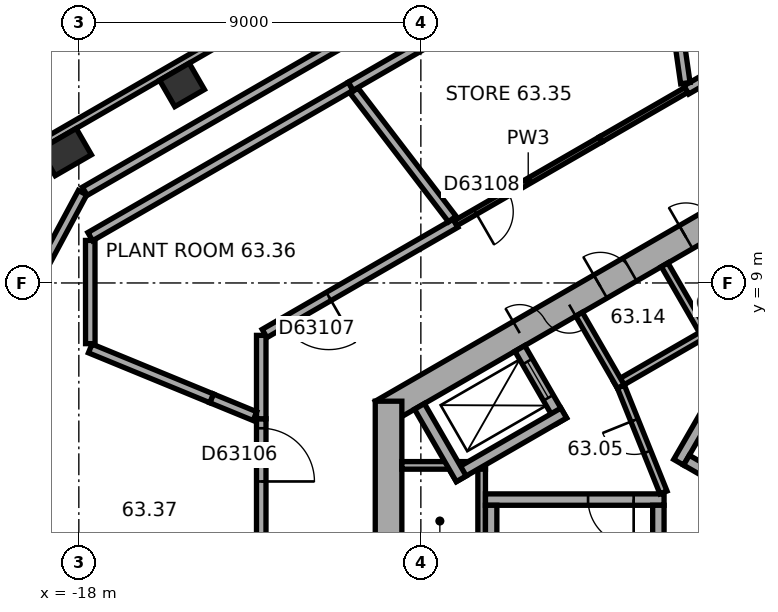
"""IFC4 building model, lengths in metres.
Left out: names, types, materials, properties, quantities, classifications, styles, units other than length and angle.
Written with IfcOpenShell. Run it as: python <this file> out.ifc"""

import sys

from ifc_helpers import new_model, si_unit, direction, frame, frame_2d, origin, origin_2d, place, context, subcontext, project, spatial, rectangle, extrude, element, fill, save


model = new_model("IFC4")
c1 = context("Model", 3, precision=1e-05, world=origin(), true_north=direction((0.0, 1.0)))
c2 = subcontext(c1, "Body", "Model", "MODEL_VIEW")
j1 = project(units=[si_unit("LENGTHUNIT", "METRE"), si_unit("PLANEANGLEUNIT", "RADIAN")], contexts=[c1])
p1 = place(None, origin())
s1 = spatial("IfcSite", under=j1, at=p1, CompositionType="ELEMENT")
p2 = place(p1, origin())
s2 = spatial("IfcBuilding", under=s1, at=p2, CompositionType="ELEMENT")
p3 = place(p2, frame((0.0, 0.0, 255.0)))
s3 = spatial("IfcBuildingStorey", under=s2, at=p3, CompositionType="ELEMENT", Elevation=255.0)
p4 = place(p3, frame((-15.285, 14.211, 0.0), z_axis=(0.0, 0.0, 1.0), x_axis=(-0.866025403784, -0.5, 0.0)))
e1 = element("IfcColumn", 1, at=p4, inside=s3, PredefinedType="COLUMN", context=c2, shape_type="SweptSolid", body=[
    extrude(rectangle(XDim=0.9, YDim=0.8, at=origin_2d()), origin(), (0.0, 0.0, 1.0), 4.8),
])
p5 = place(p3, frame((-18.345, 12.445, 0.0), z_axis=(0.0, 0.0, 1.0), x_axis=(-0.866025403784, -0.5, 0.0)))
e2 = element("IfcColumn", 2, at=p5, inside=s3, PredefinedType="COLUMN", context=c2, shape_type="SweptSolid", body=[
    extrude(rectangle(XDim=1.1, YDim=0.8, at=origin_2d()), origin(), (0.0, 0.0, 1.0), 4.8),
])
p6 = place(p3, frame((0.175, 11.475, 0.0), z_axis=(0.0, 0.0, 1.0), x_axis=(-0.866026453023, -0.499998182661, 0.0)))
e3 = element("IfcWall", 3, at=p6, inside=s3, PredefinedType="SHEAR", context=c2, shape_type="SweptSolid", body=[
    extrude(rectangle(XDim=11.778, YDim=0.7, at=frame_2d((5.889, 0.0))), origin(), (0.0, 0.0, 1.0), 4.8),
])
p7 = place(p6, frame((6.089, 0.0, 0.0)))
e4 = element("IfcOpeningElement", 4, at=p7, cuts=e3, PredefinedType="OPENING", context=c2, shape_type="SweptSolid", body=[
    extrude(rectangle(XDim=1.5, YDim=2.1, at=frame_2d((0.75, 1.05))), frame((0.0, 0.36, 0.0), z_axis=(0.0, -1.0, 0.0), x_axis=(1.0, 0.0, 0.0)), (0.0, 0.0, 1.0), 0.72),
])
p8 = place(p6, frame((1.639, 0.0, 0.0)))
e5 = element("IfcOpeningElement", 5, at=p8, cuts=e3, PredefinedType="OPENING", context=c2, shape_type="SweptSolid", body=[
    extrude(rectangle(XDim=0.9, YDim=2.1, at=frame_2d((0.45, 1.05))), frame((0.0, 0.36, 0.0), z_axis=(0.0, -1.0, 0.0), x_axis=(1.0, 0.0, 0.0)), (0.0, 0.0, 1.0), 0.72),
])
p9 = place(p6, frame((4.239, 0.0, 0.0)))
e6 = element("IfcOpeningElement", 6, at=p9, cuts=e3, PredefinedType="OPENING", context=c2, shape_type="SweptSolid", body=[
    extrude(rectangle(XDim=0.9, YDim=2.1, at=frame_2d((0.45, 1.05))), frame((0.0, 0.36, 0.0), z_axis=(0.0, -1.0, 0.0), x_axis=(1.0, 0.0, 0.0)), (0.0, 0.0, 1.0), 0.72),
])
p10 = place(p3, frame((-9.85, 5.889, 0.0), z_axis=(0.0, 0.0, 1.0), x_axis=(0.0, -1.0, 0.0)))
e7 = element("IfcWall", 7, at=p10, inside=s3, PredefinedType="SHEAR", context=c2, shape_type="SweptSolid", body=[
    extrude(rectangle(XDim=11.778, YDim=0.7, at=frame_2d((5.889, 0.0))), origin(), (0.0, 0.0, 1.0), 4.8),
])
p11 = place(p10, frame((5.039, 0.0, 0.0)))
e8 = element("IfcOpeningElement", 8, at=p11, cuts=e7, PredefinedType="OPENING", context=c2, shape_type="SweptSolid", body=[
    extrude(rectangle(XDim=1.1, YDim=2.1, at=frame_2d((0.55, 1.05))), frame((0.0, 0.36, 0.0), z_axis=(0.0, -1.0, 0.0), x_axis=(1.0, 0.0, 0.0)), (0.0, 0.0, 1.0), 0.72),
])
p12 = place(p10, frame((7.639, 0.0, 0.0)))
e9 = element("IfcOpeningElement", 9, at=p12, cuts=e7, PredefinedType="OPENING", context=c2, shape_type="SweptSolid", body=[
    extrude(rectangle(XDim=1.1, YDim=2.1, at=frame_2d((0.55, 1.05))), frame((0.0, 0.36, 0.0), z_axis=(0.0, -1.0, 0.0), x_axis=(1.0, 0.0, 0.0)), (0.0, 0.0, 1.0), 0.72),
])
p13 = place(p3, frame((-2.786, 22.005, 0.0), z_axis=(0.0, 0.0, 1.0), x_axis=(-0.866026555358, -0.49999800541, 0.0)))
e10 = element("IfcWall", 10, at=p13, inside=s3, PredefinedType="STANDARD", context=c2, shape_type="SweptSolid", body=[
    extrude(rectangle(XDim=18.841, YDim=0.2, at=frame_2d((9.421, 0.0))), origin(), (0.0, 0.0, 1.0), 4.8),
])
p14 = place(p3, frame((0.803, 9.009, 0.0), z_axis=(0.0, 0.0, 1.0), x_axis=(-0.866028230842, -0.499995103361, 0.0)))
e11 = element("IfcWall", 11, at=p14, inside=s3, PredefinedType="PARTITIONING", context=c2, shape_type="SweptSolid", body=[
    extrude(rectangle(XDim=5.4, YDim=0.2, at=frame_2d((2.7, 0.0))), origin(), (0.0, 0.0, 1.0), 4.52),
])
for number, where, z_axis, x_axis in (
    (12, (-1.485, 7.572, 0.0), (0.0, 0.0, 1.0), (-0.5, 0.866, 0.0)),
    (13, (-3.737, 6.272, 0.0), (0.0, 0.0, 1.0), (-0.5, 0.866, 0.0)),
):
    element("IfcWall", number, at=place(p3, frame(where, z_axis=z_axis, x_axis=x_axis)), inside=s3, PredefinedType="PARTITIONING", context=c2, shape_type="SweptSolid", body=[
        extrude(rectangle(XDim=2.2, YDim=0.2, at=frame_2d((1.1, 0.0))), origin(), (0.0, 0.0, 1.0), 4.52),
    ])
p15 = place(p3, frame((-7.4, 4.3, 0.0), z_axis=(0.0, 0.0, 1.0), x_axis=(0.0, -1.0, 0.0)))
e14 = element("IfcWall", 14, at=p15, inside=s3, PredefinedType="PARTITIONING", context=c2, shape_type="SweptSolid", body=[
    extrude(rectangle(XDim=8.0, YDim=0.2, at=frame_2d((4.0, 0.0))), origin(), (0.0, 0.0, 1.0), 4.52),
])
p16 = place(p3, frame((-7.3, 4.2, 0.0), z_axis=(0.0, 0.0, 1.0), x_axis=(-1.0, 0.0, 0.0)))
e15 = element("IfcWall", 15, at=p16, inside=s3, PredefinedType="PARTITIONING", context=c2, shape_type="SweptSolid", body=[
    extrude(rectangle(XDim=2.2, YDim=0.2, at=frame_2d((1.1, 0.0))), origin(), (0.0, 0.0, 1.0), 4.52),
])
p17 = place(p3, frame((-2.216, 4.282, 0.0), z_axis=(0.0, 0.0, 1.0), x_axis=(0.499977259774, 0.866038532462, 0.0)))
e16 = element("IfcWall", 16, at=p17, inside=s3, PredefinedType="SHEAR", context=c2, shape_type="SweptSolid", body=[
    extrude(rectangle(XDim=4.7, YDim=0.3, at=frame_2d((2.35, 0.0))), origin(), (0.0, 0.0, 1.0), 4.52),
])
p18 = place(p3, frame((4.103, 0.807, 0.0), z_axis=(0.0, 0.0, 1.0), x_axis=(-0.866027801685, 0.499995846692, 0.0)))
e17 = element("IfcWall", 17, at=p18, inside=s3, PredefinedType="SHEAR", context=c2, shape_type="SweptSolid", body=[
    extrude(rectangle(XDim=7.06, YDim=0.3, at=frame_2d((3.53, 0.0))), origin(), (0.0, 0.0, 1.0), 4.52),
])
p19 = place(p3, frame((-2.6, 3.3, 0.0), z_axis=(0.0, 0.0, 1.0), x_axis=(-1.0, 0.0, 0.0)))
e18 = element("IfcWall", 18, at=p19, inside=s3, PredefinedType="SHEAR", context=c2, shape_type="SweptSolid", body=[
    extrude(rectangle(XDim=4.7, YDim=0.3, at=frame_2d((2.35, 0.0))), origin(), (0.0, 0.0, 1.0), 4.52),
])
p20 = place(p19, frame((0.8, 0.0, 0.0)))
e19 = element("IfcOpeningElement", 19, at=p20, cuts=e18, PredefinedType="OPENING", context=c2, shape_type="SweptSolid", body=[
    extrude(rectangle(XDim=1.2, YDim=2.1, at=frame_2d((0.6, 1.05))), frame((0.0, 0.16, 0.0), z_axis=(0.0, -1.0, 0.0), x_axis=(1.0, 0.0, 0.0)), (0.0, 0.0, 1.0), 0.32),
])
for number, where, z_axis, x_axis in (
    (20, (-2.75, 3.15, 0.0), (0.0, 0.0, 1.0), (0.0, -1.0, 0.0)),
    (21, (-7.15, 3.15, 0.0), (0.0, 0.0, 1.0), (0.0, -1.0, 0.0)),
):
    element("IfcWall", number, at=place(p3, frame(where, z_axis=z_axis, x_axis=x_axis)), inside=s3, PredefinedType="SHEAR", context=c2, shape_type="SweptSolid", body=[
        extrude(rectangle(XDim=7.06, YDim=0.3, at=frame_2d((3.53, 0.0))), origin(), (0.0, 0.0, 1.0), 4.52),
    ])
p21 = place(p3, frame((-5.295, 5.372, 0.0), z_axis=(0.0, 0.0, 1.0), x_axis=(-0.500077893725, 0.86598042715, 0.0)))
e22 = element("IfcWall", 22, at=p21, inside=s3, PredefinedType="SHEAR", context=c2, shape_type="SweptSolid", body=[
    extrude(rectangle(XDim=2.2, YDim=0.3, at=frame_2d((1.1, 0.0))), origin(), (0.0, 0.0, 1.0), 4.52),
])
p22 = place(p21, frame((0.7, 0.0, 0.0)))
e23 = element("IfcOpeningElement", 23, at=p22, cuts=e22, PredefinedType="OPENING", context=c2, shape_type="SweptSolid", body=[
    extrude(rectangle(XDim=1.1, YDim=2.1, at=frame_2d((0.55, 1.05))), frame((0.0, 0.16, 0.0), z_axis=(0.0, -1.0, 0.0), x_axis=(1.0, 0.0, 0.0)), (0.0, 0.0, 1.0), 0.32),
])
p23 = place(p3, frame((-5.24, 5.577, 0.0), z_axis=(0.0, 0.0, 1.0), x_axis=(-0.866014461049, -0.500018952895, 0.0)))
e24 = element("IfcWall", 24, at=p23, inside=s3, PredefinedType="SHEAR", context=c2, shape_type="SweptSolid", body=[
    extrude(rectangle(XDim=3.35, YDim=0.3, at=frame_2d((1.675, 0.0))), origin(), (0.0, 0.0, 1.0), 4.52),
])
p24 = place(p3, frame((-7.937, 3.847, 0.0), z_axis=(0.0, 0.0, 1.0), x_axis=(-0.50002983664, 0.866008176907, 0.0)))
e25 = element("IfcWall", 25, at=p24, inside=s3, PredefinedType="SHEAR", context=c2, shape_type="SweptSolid", body=[
    extrude(rectangle(XDim=2.2, YDim=0.3, at=frame_2d((1.1, 0.0))), origin(), (0.0, 0.0, 1.0), 4.52),
])
p25 = place(p3, frame((-2.615, 3.487, 0.0), z_axis=(0.0, 0.0, 1.0), x_axis=(-0.373576831041, 0.92759924068, 0.0)))
e26 = element("IfcWall", 26, at=p25, inside=s3, PredefinedType="PARTITIONING", context=c2, shape_type="SweptSolid", body=[
    extrude(rectangle(XDim=3.002, YDim=0.2, at=frame_2d((1.501, 0.0))), origin(), (0.0, 0.0, 1.0), 4.52),
])
p26 = place(p25, frame((1.15, 0.0, 0.0)))
e27 = element("IfcOpeningElement", 27, at=p26, cuts=e26, PredefinedType="OPENING", context=c2, shape_type="SweptSolid", body=[
    extrude(rectangle(XDim=0.9, YDim=2.1, at=frame_2d((0.45, 1.05))), frame((0.0, 0.11, 0.0), z_axis=(0.0, -1.0, 0.0), x_axis=(1.0, 0.0, 0.0)), (0.0, 0.0, 1.0), 0.22),
])
p27 = place(p3, frame((-18.711, -2.028, 0.0), z_axis=(0.0, 0.0, 1.0), x_axis=(-0.061055377069, 0.998134380197, 0.0)))
e28 = element("IfcWall", 28, at=p27, inside=s3, PredefinedType="SOLIDWALL", context=c2, shape_type="SweptSolid", body=[
    extrude(rectangle(XDim=9.985, YDim=0.25, at=frame_2d((4.992, 0.0))), origin(), (0.0, 0.0, 1.0), 4.02),
])
p28 = place(p3, frame((-13.2, 2.0, 0.0), z_axis=(0.0, 0.0, 1.0), x_axis=(0.0, 1.0, 0.0)))
e29 = element("IfcWall", 29, at=p28, inside=s3, PredefinedType="SOLIDWALL", context=c2, shape_type="SweptSolid", body=[
    extrude(rectangle(XDim=3.427, YDim=0.25, at=frame_2d((1.713, 0.0))), origin(), (0.0, 0.0, 1.0), 4.52),
])
p29 = place(p28, frame((1.777, 0.0, 0.0)))
e30 = element("IfcOpeningElement", 30, at=p29, cuts=e29, PredefinedType="OPENING", context=c2, shape_type="SweptSolid", body=[
    extrude(rectangle(XDim=1.4, YDim=2.1, at=frame_2d((0.7, 1.05))), frame((0.0, 0.135, 0.0), z_axis=(0.0, -1.0, 0.0), x_axis=(1.0, 0.0, 0.0)), (0.0, 0.0, 1.0), 0.27),
])
p30 = place(p3, frame((-13.2, 5.427, 0.0), z_axis=(0.0, 0.0, 1.0), x_axis=(0.0, 1.0, 0.0)))
e31 = element("IfcWall", 31, at=p30, inside=s3, PredefinedType="SOLIDWALL", context=c2, shape_type="SweptSolid", body=[
    extrude(rectangle(XDim=2.194, YDim=0.25, at=frame_2d((1.097, 0.0))), origin(), (0.0, 0.0, 1.0), 4.52),
])
p31 = place(p3, frame((-14.507, 5.964, 0.0), z_axis=(0.0, 0.0, 1.0), x_axis=(0.924883043388, -0.380251700922, 0.0)))
e32 = element("IfcWall", 32, at=p31, inside=s3, PredefinedType="SOLIDWALL", context=c2, shape_type="SweptSolid", body=[
    extrude(rectangle(XDim=1.233, YDim=0.25, at=frame_2d((0.616, 0.0))), origin(), (0.0, 0.0, 1.0), 3.6),
])
p32 = place(p3, frame((-14.507, 5.964, 0.0), z_axis=(0.0, 0.0, 1.0), x_axis=(-0.924874203711, 0.380273200884, 0.0)))
e33 = element("IfcWall", 33, at=p32, inside=s3, PredefinedType="SOLIDWALL", context=c2, shape_type="SweptSolid", body=[
    extrude(rectangle(XDim=3.453, YDim=0.25, at=frame_2d((1.726, 0.0))), origin(), (0.0, 0.0, 1.0), 3.6),
])
p33 = place(p3, frame((-17.698, 7.403, 0.0), z_axis=(0.0, 0.0, 1.0), x_axis=(-0.000719165582, 0.9999997414, 0.0)))
e34 = element("IfcWall", 34, at=p33, inside=s3, PredefinedType="SOLIDWALL", context=c2, shape_type="SweptSolid", body=[
    extrude(rectangle(XDim=2.716, YDim=0.25, at=frame_2d((1.358, 0.0))), origin(), (0.0, 0.0, 1.0), 4.52),
])
p34 = place(p3, frame((-19.339, 8.702, 0.0), z_axis=(0.0, 0.0, 1.0), x_axis=(0.473308147517, 0.880896927849, 0.0)))
e35 = element("IfcWall", 35, at=p34, inside=s3, PredefinedType="SOLIDWALL", context=c2, shape_type="SweptSolid", body=[
    extrude(rectangle(XDim=3.035, YDim=0.25, at=frame_2d((1.518, 0.0))), origin(), (0.0, 0.0, 1.0), 4.52),
])
p35 = place(p3, frame((-17.7, 10.219, 0.0), z_axis=(0.0, 0.0, 1.0), x_axis=(0.866032502725, 0.499987704073, 0.0)))
e36 = element("IfcWall", 36, at=p35, inside=s3, PredefinedType="SOLIDWALL", context=c2, shape_type="SweptSolid", body=[
    extrude(rectangle(XDim=7.914, YDim=0.25, at=frame_2d((3.957, 0.0))), origin(), (0.0, 0.0, 1.0), 4.52),
])
p36 = place(p3, frame((-8.088, 10.572, 0.0), z_axis=(0.0, 0.0, 1.0), x_axis=(-0.866025827221, -0.499999266586, 0.0)))
e37 = element("IfcWall", 37, at=p36, inside=s3, PredefinedType="SOLIDWALL", context=c2, shape_type="SweptSolid", body=[
    extrude(rectangle(XDim=5.802, YDim=0.25, at=frame_2d((2.901, 0.0))), origin(), (0.0, 0.0, 1.0), 4.52),
])
p37 = place(p36, frame((3.852, 0.0, 0.0)))
e38 = element("IfcOpeningElement", 38, at=p37, cuts=e37, PredefinedType="OPENING", context=c2, shape_type="SweptSolid", body=[
    extrude(rectangle(XDim=1.4, YDim=2.1, at=frame_2d((0.7, 1.05))), frame((0.0, 0.135, 0.0), z_axis=(0.0, -1.0, 0.0), x_axis=(1.0, 0.0, 0.0)), (0.0, 0.0, 1.0), 0.27),
])
p38 = place(p3, frame((-8.089, 10.572, 0.0), z_axis=(0.0, 0.0, 1.0), x_axis=(0.866021869519, 0.500006121477, 0.0)))
e39 = element("IfcWall", 39, at=p38, inside=s3, PredefinedType="PARTITIONING", context=c2, shape_type="SweptSolid", body=[
    extrude(rectangle(XDim=4.42, YDim=0.15, at=frame_2d((2.21, 0.0))), origin(), (0.0, 0.0, 1.0), 4.52),
])
p39 = place(p38, frame((0.6, 0.0, 0.0)))
e40 = element("IfcOpeningElement", 40, at=p39, cuts=e39, PredefinedType="OPENING", context=c2, shape_type="SweptSolid", body=[
    extrude(rectangle(XDim=1.0, YDim=2.1, at=frame_2d((0.5, 1.05))), frame((0.0, 0.085, 0.0), z_axis=(0.0, -1.0, 0.0), x_axis=(1.0, 0.0, 0.0)), (0.0, 0.0, 1.0), 0.17),
])
p40 = place(p3, frame((-8.174, 10.683, 0.0), z_axis=(0.0, 0.0, 1.0), x_axis=(-0.607669565566, 0.794189964104, 0.0)))
e41 = element("IfcWall", 41, at=p40, inside=s3, PredefinedType="SOLIDWALL", context=c2, shape_type="SweptSolid", body=[
    extrude(rectangle(XDim=4.253, YDim=0.25, at=frame_2d((2.126, 0.0))), origin(), (0.0, 0.0, 1.0), 3.6),
])
p41 = place(p3, frame((-17.844, 11.412, 0.0), z_axis=(0.0, 0.0, 1.0), x_axis=(0.86603532492, 0.499982815695, 0.0)))
e42 = element("IfcWall", 42, at=p41, inside=s3, PredefinedType="SOLIDWALL", context=c2, shape_type="SweptSolid", body=[
    extrude(rectangle(XDim=17.885, YDim=0.25, at=frame_2d((8.942, 0.0))), origin(), (0.0, 0.0, 1.0), 4.02),
])
p42 = place(p3, frame((-4.26, 12.782, 0.0), z_axis=(0.0, 0.0, 1.0), x_axis=(0.866010015463, 0.500026652407, 0.0)))
e43 = element("IfcWall", 43, at=p42, inside=s3, PredefinedType="PARTITIONING", context=c2, shape_type="SweptSolid", body=[
    extrude(rectangle(XDim=2.594, YDim=0.15, at=frame_2d((1.297, 0.0))), origin(), (0.0, 0.0, 1.0), 4.52),
])
p43 = place(p3, frame((-10.846, 14.176, 0.0), z_axis=(0.0, 0.0, 1.0), x_axis=(0.866021196397, 0.500007287337, 0.0)))
e44 = element("IfcWall", 44, at=p43, inside=s3, PredefinedType="SOLIDWALL", context=c2, shape_type="SweptSolid", body=[
    extrude(rectangle(XDim=9.225, YDim=0.25, at=frame_2d((4.612, 0.0))), origin(), (0.0, 0.0, 1.0), 4.52),
])
p44 = place(p3, frame((0.0, 15.242, 0.0), z_axis=(0.0, 0.0, 1.0), x_axis=(-0.866057993361, -0.499943548949, 0.0)))
e45 = element("IfcWall", 45, at=p44, inside=s3, PredefinedType="SOLIDWALL", context=c2, shape_type="SweptSolid", body=[
    extrude(rectangle(XDim=2.326, YDim=0.25, at=frame_2d((1.163, 0.0))), origin(), (0.0, 0.0, 1.0), 4.52),
])
p45 = place(p3, frame((-2.664, 18.62, 0.0), z_axis=(0.0, 0.0, 1.0), x_axis=(0.1415842094, -0.989926215255, 0.0)))
e46 = element("IfcWall", 46, at=p45, inside=s3, PredefinedType="SOLIDWALL", context=c2, shape_type="SweptSolid", body=[
    extrude(rectangle(XDim=4.407, YDim=0.25, at=frame_2d((2.204, 0.0))), origin(), (0.0, 0.0, 1.0), 3.6),
])
p46 = place(p7, origin())
e47 = element("IfcDoor", 47, at=p46, inside=s3, OperationType="DOUBLE_DOOR_SINGLE_SWING", PredefinedType="DOOR", context=c2, shape_type="SweptSolid", body=[
    extrude(rectangle(XDim=1.5, YDim=2.1, at=frame_2d((0.75, 1.05))), frame((0.0, 0.025, 0.0), z_axis=(0.0, -1.0, 0.0), x_axis=(1.0, 0.0, 0.0)), (0.0, 0.0, 1.0), 0.05),
])
fill(e4, e47)
p47 = place(p20, origin())
e48 = element("IfcDoor", 48, at=p47, inside=s3, OperationType="SINGLE_SWING_RIGHT", PredefinedType="DOOR", context=c2, shape_type="SweptSolid", body=[
    extrude(rectangle(XDim=1.2, YDim=2.1, at=frame_2d((0.6, 1.05))), frame((0.0, 0.025, 0.0), z_axis=(0.0, -1.0, 0.0), x_axis=(1.0, 0.0, 0.0)), (0.0, 0.0, 1.0), 0.05),
])
fill(e19, e48)
p48 = place(p26, origin())
e49 = element("IfcDoor", 49, at=p48, inside=s3, OperationType="SINGLE_SWING_LEFT", PredefinedType="DOOR", context=c2, shape_type="SweptSolid", body=[
    extrude(rectangle(XDim=0.9, YDim=2.1, at=frame_2d((0.45, 1.05))), frame((0.0, 0.025, 0.0), z_axis=(0.0, -1.0, 0.0), x_axis=(1.0, 0.0, 0.0)), (0.0, 0.0, 1.0), 0.05),
])
fill(e27, e49)
p49 = place(p8, origin())
e50 = element("IfcDoor", 50, at=p49, inside=s3, OperationType="SINGLE_SWING_LEFT", PredefinedType="DOOR", context=c2, shape_type="SweptSolid", body=[
    extrude(rectangle(XDim=0.9, YDim=2.1, at=frame_2d((0.45, 1.05))), frame((0.0, 0.025, 0.0), z_axis=(0.0, -1.0, 0.0), x_axis=(1.0, 0.0, 0.0)), (0.0, 0.0, 1.0), 0.05),
])
fill(e5, e50)
p50 = place(p9, origin())
e51 = element("IfcDoor", 51, at=p50, inside=s3, OperationType="SINGLE_SWING_LEFT", PredefinedType="DOOR", context=c2, shape_type="SweptSolid", body=[
    extrude(rectangle(XDim=0.9, YDim=2.1, at=frame_2d((0.45, 1.05))), frame((0.0, 0.025, 0.0), z_axis=(0.0, -1.0, 0.0), x_axis=(1.0, 0.0, 0.0)), (0.0, 0.0, 1.0), 0.05),
])
fill(e6, e51)
p51 = place(p22, origin())
e52 = element("IfcDoor", 52, at=p51, inside=s3, OperationType="DOUBLE_DOOR_SLIDING", PredefinedType="DOOR", context=c2, shape_type="SweptSolid", body=[
    extrude(rectangle(XDim=1.1, YDim=2.1, at=frame_2d((0.55, 1.05))), frame((0.0, 0.025, 0.0), z_axis=(0.0, -1.0, 0.0), x_axis=(1.0, 0.0, 0.0)), (0.0, 0.0, 1.0), 0.05),
])
fill(e23, e52)
p52 = place(p29, origin())
e53 = element("IfcDoor", 53, at=p52, inside=s3, OperationType="SINGLE_SWING_LEFT", PredefinedType="DOOR", context=c2, shape_type="SweptSolid", body=[
    extrude(rectangle(XDim=1.4, YDim=2.1, at=frame_2d((0.7, 1.05))), frame((0.0, 0.025, 0.0), z_axis=(0.0, -1.0, 0.0), x_axis=(1.0, 0.0, 0.0)), (0.0, 0.0, 1.0), 0.05),
])
fill(e30, e53)
p53 = place(p37, origin())
e54 = element("IfcDoor", 54, at=p53, inside=s3, OperationType="SINGLE_SWING_LEFT", PredefinedType="DOOR", context=c2, shape_type="SweptSolid", body=[
    extrude(rectangle(XDim=1.4, YDim=2.1, at=frame_2d((0.7, 1.05))), frame((0.0, 0.025, 0.0), z_axis=(0.0, -1.0, 0.0), x_axis=(1.0, 0.0, 0.0)), (0.0, 0.0, 1.0), 0.05),
])
fill(e38, e54)
p54 = place(p39, origin())
e55 = element("IfcDoor", 55, at=p54, inside=s3, OperationType="SINGLE_SWING_LEFT", PredefinedType="DOOR", context=c2, shape_type="SweptSolid", body=[
    extrude(rectangle(XDim=1.0, YDim=2.1, at=frame_2d((0.5, 1.05))), frame((0.0, 0.025, 0.0), z_axis=(0.0, -1.0, 0.0), x_axis=(1.0, 0.0, 0.0)), (0.0, 0.0, 1.0), 0.05),
])
fill(e40, e55)
save(model, sys.argv[1])
